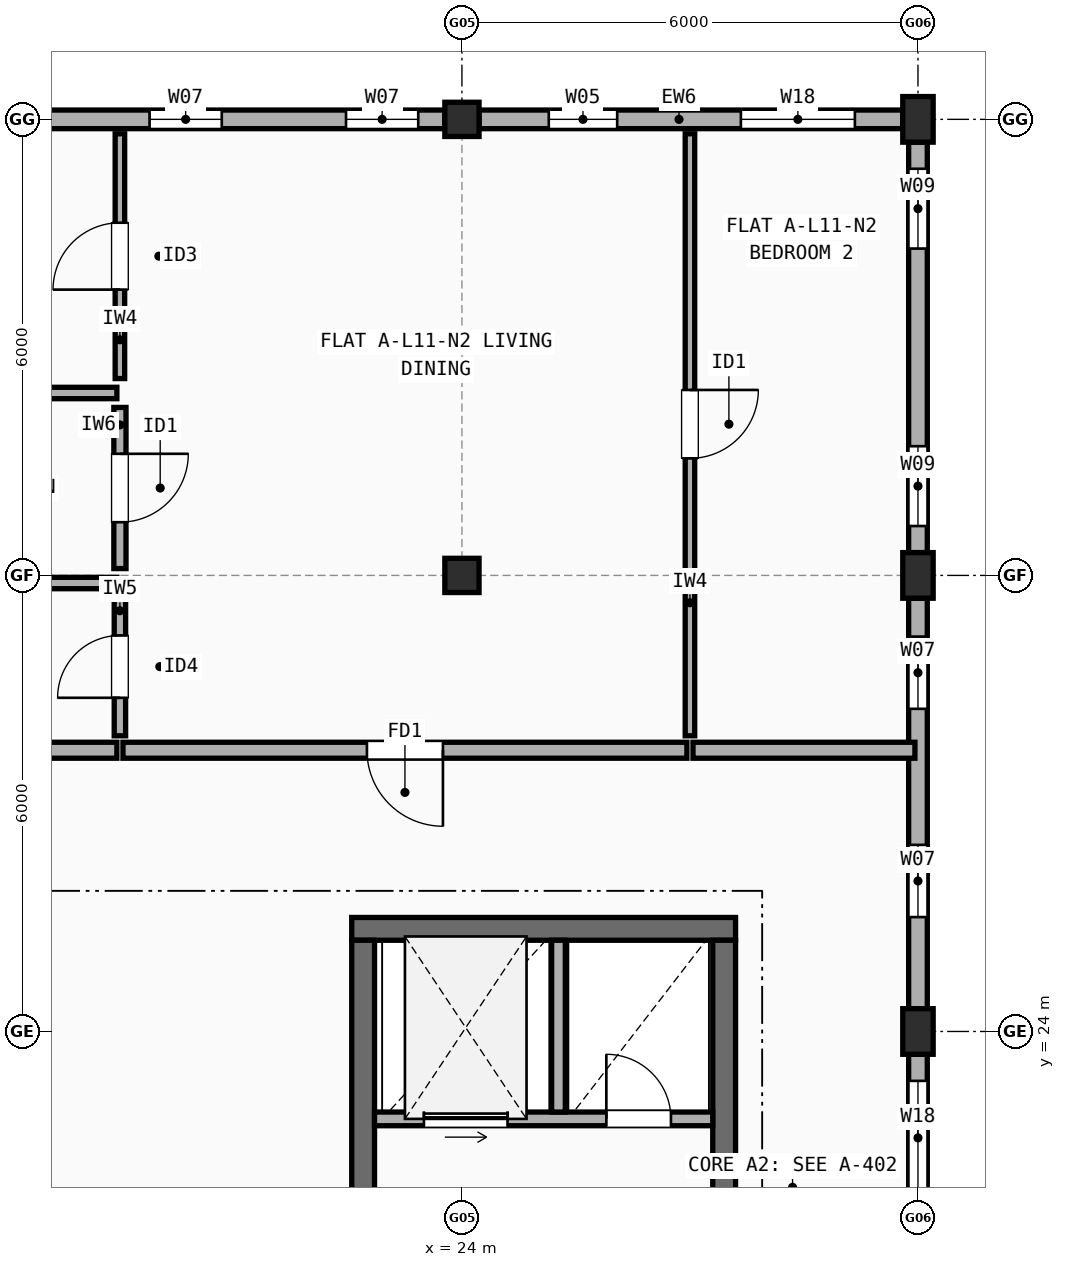
"""IFC4 building model, lengths in metres.
Left out: names, types, materials, properties, quantities, classifications, styles, units other than length and angle.
Written with IfcOpenShell. Run it as: python <this file> out.ifc"""

import sys

from ifc_helpers import new_model, si_unit, direction, frame, frame_2d, origin, origin_2d, place, context, subcontext, project, spatial, rectangle, extrude, element, fill, save


model = new_model("IFC4")
c1 = context("Model", 3, precision=1e-05, world=origin(), true_north=direction((0.0, 1.0)))
c2 = subcontext(c1, "Body", "Model", "MODEL_VIEW")
j1 = project(units=[si_unit("LENGTHUNIT", "METRE"), si_unit("PLANEANGLEUNIT", "RADIAN")], contexts=[c1])
p1 = place(None, origin())
s1 = spatial("IfcSite", under=j1, at=p1, CompositionType="ELEMENT")
p2 = place(p1, origin())
s2 = spatial("IfcBuilding", under=s1, at=p2, CompositionType="ELEMENT")
p3 = place(p2, frame((0.0, 0.0, 36.5)))
s3 = spatial("IfcBuildingStorey", under=s2, at=p3, CompositionType="ELEMENT", Elevation=36.5)
for number, where, z_axis, x_axis in (
    (1, (24.0, 30.0, 0.0), (0.0, 0.0, 1.0), (1.0, 0.0, 0.0)),
    (2, (24.0, 36.0, 0.0), (0.0, 0.0, 1.0), (1.0, 0.0, 0.0)),
):
    element("IfcColumn", number, at=place(p3, frame(where, z_axis=z_axis, x_axis=x_axis)), inside=s3, PredefinedType="COLUMN", context=c2, shape_type="SweptSolid", body=[
        extrude(rectangle(XDim=0.45, YDim=0.45, at=origin_2d()), origin(), (0.0, 0.0, 1.0), 2.995),
    ])
for number, where, z_axis, x_axis in (
    (3, (30.0, 24.0, 0.0), (0.0, 0.0, 1.0), (1.0, 0.0, 0.0)),
    (4, (30.0, 30.0, 0.0), (0.0, 0.0, 1.0), (1.0, 0.0, 0.0)),
    (5, (30.0, 36.0, 0.0), (0.0, 0.0, 1.0), (1.0, 0.0, 0.0)),
):
    element("IfcColumn", number, at=place(p3, frame(where, z_axis=z_axis, x_axis=x_axis)), inside=s3, PredefinedType="COLUMN", context=c2, shape_type="SweptSolid", body=[
        extrude(rectangle(XDim=0.4, YDim=0.6, at=origin_2d()), origin(), (0.0, 0.0, 1.0), 2.995),
    ])
p4 = place(p3, frame((30.0, 18.3, 0.0), z_axis=(0.0, 0.0, 1.0), x_axis=(0.0, 1.0, 0.0)))
e6 = element("IfcWall", 6, at=p4, inside=s3, PredefinedType="STANDARD", context=c2, shape_type="SweptSolid", body=[
    extrude(rectangle(XDim=5.4, YDim=0.245, at=frame_2d((2.7, 0.0))), origin(), (0.0, 0.0, 1.0), 2.477),
])
p5 = place(p4, frame((0.35, 0.0, 0.9)))
e7 = element("IfcOpeningElement", 7, at=p5, cuts=e6, PredefinedType="OPENING", context=c2, shape_type="SweptSolid", body=[
    extrude(rectangle(XDim=1.5, YDim=1.4, at=frame_2d((0.75, 0.7))), frame((0.0, 0.133, 0.0), z_axis=(0.0, -1.0, 0.0), x_axis=(1.0, 0.0, 0.0)), (0.0, 0.0, 1.0), 0.265),
])
p6 = place(p4, frame((3.55, 0.0, 0.9)))
e8 = element("IfcOpeningElement", 8, at=p6, cuts=e6, PredefinedType="OPENING", context=c2, shape_type="SweptSolid", body=[
    extrude(rectangle(XDim=1.5, YDim=1.4, at=frame_2d((0.75, 0.7))), frame((0.0, 0.133, 0.0), z_axis=(0.0, -1.0, 0.0), x_axis=(1.0, 0.0, 0.0)), (0.0, 0.0, 1.0), 0.265),
])
p7 = place(p3, frame((30.0, 24.3, 0.0), z_axis=(0.0, 0.0, 1.0), x_axis=(0.0, 1.0, 0.0)))
e9 = element("IfcWall", 9, at=p7, inside=s3, PredefinedType="STANDARD", context=c2, shape_type="SweptSolid", body=[
    extrude(rectangle(XDim=5.4, YDim=0.245, at=frame_2d((2.7, 0.0))), origin(), (0.0, 0.0, 1.0), 2.477),
])
p8 = place(p7, frame((1.205, 0.0, 0.9)))
e10 = element("IfcOpeningElement", 10, at=p8, cuts=e9, PredefinedType="OPENING", context=c2, shape_type="SweptSolid", body=[
    extrude(rectangle(XDim=0.95, YDim=1.35, at=frame_2d((0.475, 0.675))), frame((0.0, 0.133, 0.0), z_axis=(0.0, -1.0, 0.0), x_axis=(1.0, 0.0, 0.0)), (0.0, 0.0, 1.0), 0.265),
])
p9 = place(p7, frame((3.945, 0.0, 0.9)))
e11 = element("IfcOpeningElement", 11, at=p9, cuts=e9, PredefinedType="OPENING", context=c2, shape_type="SweptSolid", body=[
    extrude(rectangle(XDim=0.95, YDim=1.35, at=frame_2d((0.475, 0.675))), frame((0.0, 0.133, 0.0), z_axis=(0.0, -1.0, 0.0), x_axis=(1.0, 0.0, 0.0)), (0.0, 0.0, 1.0), 0.265),
])
p10 = place(p3, frame((30.0, 30.3, 0.0), z_axis=(0.0, 0.0, 1.0), x_axis=(0.0, 1.0, 0.0)))
e12 = element("IfcWall", 12, at=p10, inside=s3, PredefinedType="STANDARD", context=c2, shape_type="SweptSolid", body=[
    extrude(rectangle(XDim=5.4, YDim=0.245, at=frame_2d((2.7, 0.0))), origin(), (0.0, 0.0, 1.0), 2.477),
])
p11 = place(p10, frame((0.35, 0.0, 0.9)))
e13 = element("IfcOpeningElement", 13, at=p11, cuts=e12, PredefinedType="OPENING", context=c2, shape_type="SweptSolid", body=[
    extrude(rectangle(XDim=1.05, YDim=1.35, at=frame_2d((0.525, 0.675))), frame((0.0, 0.133, 0.0), z_axis=(0.0, -1.0, 0.0), x_axis=(1.0, 0.0, 0.0)), (0.0, 0.0, 1.0), 0.265),
])
p12 = place(p10, frame((4.0, 0.0, 0.9)))
e14 = element("IfcOpeningElement", 14, at=p12, cuts=e12, PredefinedType="OPENING", context=c2, shape_type="SweptSolid", body=[
    extrude(rectangle(XDim=1.05, YDim=1.35, at=frame_2d((0.525, 0.675))), frame((0.0, 0.133, 0.0), z_axis=(0.0, -1.0, 0.0), x_axis=(1.0, 0.0, 0.0)), (0.0, 0.0, 1.0), 0.265),
])
p13 = place(p3, frame((29.8, 36.0, 0.0), z_axis=(0.0, 0.0, 1.0), x_axis=(-1.0, 0.0, 0.0)))
e15 = element("IfcWall", 15, at=p13, inside=s3, PredefinedType="STANDARD", context=c2, shape_type="SweptSolid", body=[
    extrude(rectangle(XDim=5.575, YDim=0.245, at=frame_2d((2.788, 0.0))), origin(), (0.0, 0.0, 1.0), 2.477),
])
p14 = place(p13, frame((0.63, 0.0, 0.9)))
e16 = element("IfcOpeningElement", 16, at=p14, cuts=e15, PredefinedType="OPENING", context=c2, shape_type="SweptSolid", body=[
    extrude(rectangle(XDim=1.5, YDim=1.4, at=frame_2d((0.75, 0.7))), frame((0.0, 0.133, 0.0), z_axis=(0.0, -1.0, 0.0), x_axis=(1.0, 0.0, 0.0)), (0.0, 0.0, 1.0), 0.265),
])
p15 = place(p13, frame((3.758, 0.0, 0.9)))
e17 = element("IfcOpeningElement", 17, at=p15, cuts=e15, PredefinedType="OPENING", context=c2, shape_type="SweptSolid", body=[
    extrude(rectangle(XDim=0.9, YDim=1.4, at=frame_2d((0.45, 0.7))), frame((0.0, 0.133, 0.0), z_axis=(0.0, -1.0, 0.0), x_axis=(1.0, 0.0, 0.0)), (0.0, 0.0, 1.0), 0.265),
])
p16 = place(p3, frame((23.775, 36.0, 0.0), z_axis=(0.0, 0.0, 1.0), x_axis=(-1.0, 0.0, 0.0)))
e18 = element("IfcWall", 18, at=p16, inside=s3, PredefinedType="STANDARD", context=c2, shape_type="SweptSolid", body=[
    extrude(rectangle(XDim=5.55, YDim=0.245, at=frame_2d((2.775, 0.0))), origin(), (0.0, 0.0, 1.0), 2.477),
])
p17 = place(p16, frame((0.35, 0.0, 0.9)))
e19 = element("IfcOpeningElement", 19, at=p17, cuts=e18, PredefinedType="OPENING", context=c2, shape_type="SweptSolid", body=[
    extrude(rectangle(XDim=0.95, YDim=1.35, at=frame_2d((0.475, 0.675))), frame((0.0, 0.133, 0.0), z_axis=(0.0, -1.0, 0.0), x_axis=(1.0, 0.0, 0.0)), (0.0, 0.0, 1.0), 0.265),
])
p18 = place(p16, frame((2.935, 0.0, 0.9)))
e20 = element("IfcOpeningElement", 20, at=p18, cuts=e18, PredefinedType="OPENING", context=c2, shape_type="SweptSolid", body=[
    extrude(rectangle(XDim=0.95, YDim=1.35, at=frame_2d((0.475, 0.675))), frame((0.0, 0.133, 0.0), z_axis=(0.0, -1.0, 0.0), x_axis=(1.0, 0.0, 0.0)), (0.0, 0.0, 1.0), 0.265),
])
p19 = place(p3, frame((27.6, 25.35, 0.0), z_axis=(0.0, 0.0, 1.0), x_axis=(-1.0, 0.0, 0.0)))
e21 = element("IfcWall", 21, at=p19, inside=s3, PredefinedType="SHEAR", context=c2, shape_type="SweptSolid", body=[
    extrude(rectangle(XDim=5.05, YDim=0.3, at=frame_2d((2.525, 0.0))), origin(), (0.0, 0.0, 1.0), 2.995),
])
p20 = place(p3, frame((27.45, 18.75, 0.0), z_axis=(0.0, 0.0, 1.0), x_axis=(0.0, 1.0, 0.0)))
e22 = element("IfcWall", 22, at=p20, inside=s3, PredefinedType="SHEAR", context=c2, shape_type="SweptSolid", body=[
    extrude(rectangle(XDim=6.45, YDim=0.3, at=frame_2d((3.225, 0.0))), origin(), (0.0, 0.0, 1.0), 2.995),
])
p21 = place(p3, frame((22.7, 21.75, 0.0), z_axis=(0.0, 0.0, 1.0), x_axis=(0.0, 1.0, 0.0)))
e23 = element("IfcWall", 23, at=p21, inside=s3, PredefinedType="SHEAR", context=c2, shape_type="SweptSolid", body=[
    extrude(rectangle(XDim=3.45, YDim=0.3, at=frame_2d((1.725, 0.0))), origin(), (0.0, 0.0, 1.0), 2.995),
])
p22 = place(p3, frame((22.85, 22.85, 0.0), z_axis=(0.0, 0.0, 1.0), x_axis=(1.0, 0.0, 0.0)))
e24 = element("IfcWall", 24, at=p22, inside=s3, PredefinedType="SOLIDWALL", context=c2, shape_type="SweptSolid", body=[
    extrude(rectangle(XDim=4.45, YDim=0.18, at=frame_2d((2.225, 0.0))), origin(), (0.0, 0.0, 1.0), 2.995),
])
p23 = place(p22, frame((0.65, 0.0, 0.0)))
e25 = element("IfcOpeningElement", 25, at=p23, cuts=e24, PredefinedType="OPENING", context=c2, shape_type="SweptSolid", body=[
    extrude(rectangle(XDim=1.1, YDim=2.15, at=frame_2d((0.55, 1.075))), frame((0.0, 0.1, 0.0), z_axis=(0.0, -1.0, 0.0), x_axis=(1.0, 0.0, 0.0)), (0.0, 0.0, 1.0), 0.2),
])
p24 = place(p22, frame((3.05, 0.0, 0.0)))
e26 = element("IfcOpeningElement", 26, at=p24, cuts=e24, PredefinedType="OPENING", context=c2, shape_type="SweptSolid", body=[
    extrude(rectangle(XDim=0.85, YDim=2.1, at=frame_2d((0.425, 1.05))), frame((0.0, 0.1, 0.0), z_axis=(0.0, -1.0, 0.0), x_axis=(1.0, 0.0, 0.0)), (0.0, 0.0, 1.0), 0.2),
])
p25 = place(p3, frame((25.27, 22.94, 0.0), z_axis=(0.0, 0.0, 1.0), x_axis=(0.0, 1.0, 0.0)))
e27 = element("IfcWall", 27, at=p25, inside=s3, PredefinedType="SOLIDWALL", context=c2, shape_type="SweptSolid", body=[
    extrude(rectangle(XDim=2.26, YDim=0.18, at=frame_2d((1.13, 0.0))), origin(), (0.0, 0.0, 1.0), 2.995),
])
p26 = place(p3, frame((15.04, 27.7, 0.0), z_axis=(0.0, 0.0, 1.0), x_axis=(1.0, 0.0, 0.0)))
e28 = element("IfcWall", 28, at=p26, inside=s3, PredefinedType="SOLIDWALL", context=c2, shape_type="SweptSolid", body=[
    extrude(rectangle(XDim=4.42, YDim=0.21, at=frame_2d((2.21, 0.0))), origin(), (0.0, 0.0, 1.0), 2.995),
])
p27 = place(p3, frame((19.54, 27.7, 0.0), z_axis=(0.0, 0.0, 1.0), x_axis=(1.0, 0.0, 0.0)))
e29 = element("IfcWall", 29, at=p27, inside=s3, PredefinedType="SOLIDWALL", context=c2, shape_type="SweptSolid", body=[
    extrude(rectangle(XDim=7.42, YDim=0.21, at=frame_2d((3.71, 0.0))), origin(), (0.0, 0.0, 1.0), 2.995),
])
p28 = place(p27, frame((3.21, 0.0, 0.0)))
e30 = element("IfcOpeningElement", 30, at=p28, cuts=e29, PredefinedType="OPENING", context=c2, shape_type="SweptSolid", body=[
    extrude(rectangle(XDim=1.0, YDim=2.15, at=frame_2d((0.5, 1.075))), frame((0.0, 0.115, 0.0), z_axis=(0.0, -1.0, 0.0), x_axis=(1.0, 0.0, 0.0)), (0.0, 0.0, 1.0), 0.23),
])
p29 = place(p3, frame((19.5, 32.59, 0.0), z_axis=(0.0, 0.0, 1.0), x_axis=(0.0, 1.0, 0.0)))
e31 = element("IfcWall", 31, at=p29, inside=s3, PredefinedType="PARTITIONING", context=c2, shape_type="SweptSolid", body=[
    extrude(rectangle(XDim=3.22, YDim=0.125, at=frame_2d((1.61, 0.0))), origin(), (0.0, 0.0, 1.0), 2.995),
])
p30 = place(p29, frame((1.17, 0.0, 0.0)))
e32 = element("IfcOpeningElement", 32, at=p30, cuts=e31, PredefinedType="OPENING", context=c2, shape_type="SweptSolid", body=[
    extrude(rectangle(XDim=0.88, YDim=2.1, at=frame_2d((0.44, 1.05))), frame((0.0, 0.073, 0.0), z_axis=(0.0, -1.0, 0.0), x_axis=(1.0, 0.0, 0.0)), (0.0, 0.0, 1.0), 0.145),
])
p31 = place(p3, frame((19.5, 30.09, 0.0), z_axis=(0.0, 0.0, 1.0), x_axis=(0.0, 1.0, 0.0)))
e33 = element("IfcWall", 33, at=p31, inside=s3, PredefinedType="PLUMBINGWALL", context=c2, shape_type="SweptSolid", body=[
    extrude(rectangle(XDim=2.12, YDim=0.16, at=frame_2d((1.06, 0.0))), origin(), (0.0, 0.0, 1.0), 2.527),
])
p32 = place(p31, frame((0.61, 0.0, 0.0)))
e34 = element("IfcOpeningElement", 34, at=p32, cuts=e33, PredefinedType="OPENING", context=c2, shape_type="SweptSolid", body=[
    extrude(rectangle(XDim=0.9, YDim=2.1, at=frame_2d((0.45, 1.05))), frame((0.0, 0.09, 0.0), z_axis=(0.0, -1.0, 0.0), x_axis=(1.0, 0.0, 0.0)), (0.0, 0.0, 1.0), 0.18),
])
p33 = place(p3, frame((19.5, 27.89, 0.0), z_axis=(0.0, 0.0, 1.0), x_axis=(0.0, 1.0, 0.0)))
e35 = element("IfcWall", 35, at=p33, inside=s3, PredefinedType="PARTITIONING", context=c2, shape_type="SweptSolid", body=[
    extrude(rectangle(XDim=1.82, YDim=0.15, at=frame_2d((0.91, 0.0))), origin(), (0.0, 0.0, 1.0), 2.995),
])
p34 = place(p33, frame((0.5, 0.0, 0.0)))
e36 = element("IfcOpeningElement", 36, at=p34, cuts=e35, PredefinedType="OPENING", context=c2, shape_type="SweptSolid", body=[
    extrude(rectangle(XDim=0.82, YDim=2.08, at=frame_2d((0.41, 1.04))), frame((0.0, 0.085, 0.0), z_axis=(0.0, -1.0, 0.0), x_axis=(1.0, 0.0, 0.0)), (0.0, 0.0, 1.0), 0.17),
])
p35 = place(p3, frame((15.04, 32.4, 0.0), z_axis=(0.0, 0.0, 1.0), x_axis=(1.0, 0.0, 0.0)))
e37 = element("IfcWall", 37, at=p35, inside=s3, PredefinedType="PARTITIONING", context=c2, shape_type="SweptSolid", body=[
    extrude(rectangle(XDim=4.42, YDim=0.15, at=frame_2d((2.21, 0.0))), origin(), (0.0, 0.0, 1.0), 2.508),
])
p36 = place(p3, frame((15.04, 29.9, 0.0), z_axis=(0.0, 0.0, 1.0), x_axis=(1.0, 0.0, 0.0)))
e38 = element("IfcWall", 38, at=p36, inside=s3, PredefinedType="PARTITIONING", context=c2, shape_type="SweptSolid", body=[
    extrude(rectangle(XDim=4.42, YDim=0.15, at=frame_2d((2.21, 0.0))), origin(), (0.0, 0.0, 1.0), 2.527),
])
p37 = place(p3, frame((27.04, 27.7, 0.0), z_axis=(0.0, 0.0, 1.0), x_axis=(1.0, 0.0, 0.0)))
e39 = element("IfcWall", 39, at=p37, inside=s3, PredefinedType="SOLIDWALL", context=c2, shape_type="SweptSolid", body=[
    extrude(rectangle(XDim=2.92, YDim=0.21, at=frame_2d((1.46, 0.0))), origin(), (0.0, 0.0, 1.0), 2.477),
])
p38 = place(p3, frame((27.0, 27.89, 0.0), z_axis=(0.0, 0.0, 1.0), x_axis=(0.0, 1.0, 0.0)))
e40 = element("IfcWall", 40, at=p38, inside=s3, PredefinedType="PARTITIONING", context=c2, shape_type="SweptSolid", body=[
    extrude(rectangle(XDim=7.92, YDim=0.125, at=frame_2d((3.96, 0.0))), origin(), (0.0, 0.0, 1.0), 2.527),
])
p39 = place(p38, frame((3.65, 0.0, 0.0)))
e41 = element("IfcOpeningElement", 41, at=p39, cuts=e40, PredefinedType="OPENING", context=c2, shape_type="SweptSolid", body=[
    extrude(rectangle(XDim=0.9, YDim=2.1, at=frame_2d((0.45, 1.05))), frame((0.0, 0.073, 0.0), z_axis=(0.0, -1.0, 0.0), x_axis=(1.0, 0.0, 0.0)), (0.0, 0.0, 1.0), 0.145),
])
p40 = place(p6, origin())
e42 = element("IfcWindow", 42, at=p40, inside=s3, PartitioningType="SINGLE_PANEL", PredefinedType="WINDOW", context=c2, shape_type="SweptSolid", body=[
    extrude(rectangle(XDim=1.5, YDim=1.4, at=frame_2d((0.75, 0.7))), frame((0.0, 0.03, 0.0), z_axis=(0.0, -1.0, 0.0), x_axis=(1.0, 0.0, 0.0)), (0.0, 0.0, 1.0), 0.06),
])
fill(e8, e42)
p41 = place(p8, origin())
e43 = element("IfcWindow", 43, at=p41, inside=s3, PartitioningType="SINGLE_PANEL", PredefinedType="WINDOW", context=c2, shape_type="SweptSolid", body=[
    extrude(rectangle(XDim=0.95, YDim=1.35, at=frame_2d((0.475, 0.675))), frame((0.0, 0.03, 0.0), z_axis=(0.0, -1.0, 0.0), x_axis=(1.0, 0.0, 0.0)), (0.0, 0.0, 1.0), 0.06),
])
fill(e10, e43)
p42 = place(p9, origin())
e44 = element("IfcWindow", 44, at=p42, inside=s3, PartitioningType="SINGLE_PANEL", PredefinedType="WINDOW", context=c2, shape_type="SweptSolid", body=[
    extrude(rectangle(XDim=0.95, YDim=1.35, at=frame_2d((0.475, 0.675))), frame((0.0, 0.03, 0.0), z_axis=(0.0, -1.0, 0.0), x_axis=(1.0, 0.0, 0.0)), (0.0, 0.0, 1.0), 0.06),
])
fill(e11, e44)
p43 = place(p11, origin())
e45 = element("IfcWindow", 45, at=p43, inside=s3, PartitioningType="SINGLE_PANEL", PredefinedType="WINDOW", context=c2, shape_type="SweptSolid", body=[
    extrude(rectangle(XDim=1.05, YDim=1.35, at=frame_2d((0.525, 0.675))), frame((0.0, 0.03, 0.0), z_axis=(0.0, -1.0, 0.0), x_axis=(1.0, 0.0, 0.0)), (0.0, 0.0, 1.0), 0.06),
])
fill(e13, e45)
p44 = place(p12, origin())
e46 = element("IfcWindow", 46, at=p44, inside=s3, PartitioningType="SINGLE_PANEL", PredefinedType="WINDOW", context=c2, shape_type="SweptSolid", body=[
    extrude(rectangle(XDim=1.05, YDim=1.35, at=frame_2d((0.525, 0.675))), frame((0.0, 0.03, 0.0), z_axis=(0.0, -1.0, 0.0), x_axis=(1.0, 0.0, 0.0)), (0.0, 0.0, 1.0), 0.06),
])
fill(e14, e46)
p45 = place(p14, origin())
e47 = element("IfcWindow", 47, at=p45, inside=s3, PartitioningType="SINGLE_PANEL", PredefinedType="WINDOW", context=c2, shape_type="SweptSolid", body=[
    extrude(rectangle(XDim=1.5, YDim=1.4, at=frame_2d((0.75, 0.7))), frame((0.0, 0.03, 0.0), z_axis=(0.0, -1.0, 0.0), x_axis=(1.0, 0.0, 0.0)), (0.0, 0.0, 1.0), 0.06),
])
fill(e16, e47)
p46 = place(p15, origin())
e48 = element("IfcWindow", 48, at=p46, inside=s3, PartitioningType="SINGLE_PANEL", PredefinedType="WINDOW", context=c2, shape_type="SweptSolid", body=[
    extrude(rectangle(XDim=0.9, YDim=1.4, at=frame_2d((0.45, 0.7))), frame((0.0, 0.03, 0.0), z_axis=(0.0, -1.0, 0.0), x_axis=(1.0, 0.0, 0.0)), (0.0, 0.0, 1.0), 0.06),
])
fill(e17, e48)
p47 = place(p17, origin())
e49 = element("IfcWindow", 49, at=p47, inside=s3, PartitioningType="SINGLE_PANEL", PredefinedType="WINDOW", context=c2, shape_type="SweptSolid", body=[
    extrude(rectangle(XDim=0.95, YDim=1.35, at=frame_2d((0.475, 0.675))), frame((0.0, 0.03, 0.0), z_axis=(0.0, -1.0, 0.0), x_axis=(1.0, 0.0, 0.0)), (0.0, 0.0, 1.0), 0.06),
])
fill(e19, e49)
p48 = place(p18, origin())
e50 = element("IfcWindow", 50, at=p48, inside=s3, PartitioningType="SINGLE_PANEL", PredefinedType="WINDOW", context=c2, shape_type="SweptSolid", body=[
    extrude(rectangle(XDim=0.95, YDim=1.35, at=frame_2d((0.475, 0.675))), frame((0.0, 0.03, 0.0), z_axis=(0.0, -1.0, 0.0), x_axis=(1.0, 0.0, 0.0)), (0.0, 0.0, 1.0), 0.06),
])
fill(e20, e50)
p49 = place(p23, origin())
e51 = element("IfcDoor", 51, at=p49, inside=s3, OperationType="SLIDING_TO_LEFT", PredefinedType="DOOR", context=c2, shape_type="SweptSolid", body=[
    extrude(rectangle(XDim=1.1, YDim=2.15, at=frame_2d((0.55, 1.075))), frame((0.0, 0.025, 0.0), z_axis=(0.0, -1.0, 0.0), x_axis=(1.0, 0.0, 0.0)), (0.0, 0.0, 1.0), 0.05),
])
fill(e25, e51)
p50 = place(p24, frame((0.85, 0.0, 0.0), z_axis=(0.0, 0.0, 1.0), x_axis=(-1.0, 0.0, 0.0)))
e52 = element("IfcDoor", 52, at=p50, inside=s3, OperationType="SINGLE_SWING_LEFT", PredefinedType="DOOR", context=c2, shape_type="SweptSolid", body=[
    extrude(rectangle(XDim=0.85, YDim=2.1, at=frame_2d((0.425, 1.05))), frame((0.0, 0.025, 0.0), z_axis=(0.0, -1.0, 0.0), x_axis=(1.0, 0.0, 0.0)), (0.0, 0.0, 1.0), 0.05),
])
fill(e26, e52)
p51 = place(p28, origin())
e53 = element("IfcDoor", 53, at=p51, inside=s3, OperationType="SINGLE_SWING_RIGHT", PredefinedType="DOOR", context=c2, shape_type="SweptSolid", body=[
    extrude(rectangle(XDim=1.0, YDim=2.15, at=frame_2d((0.5, 1.075))), frame((0.0, 0.025, 0.0), z_axis=(0.0, -1.0, 0.0), x_axis=(1.0, 0.0, 0.0)), (0.0, 0.0, 1.0), 0.05),
])
fill(e30, e53)
p52 = place(p30, origin())
e54 = element("IfcDoor", 54, at=p52, inside=s3, OperationType="SINGLE_SWING_LEFT", PredefinedType="DOOR", context=c2, shape_type="SweptSolid", body=[
    extrude(rectangle(XDim=0.88, YDim=2.1, at=frame_2d((0.44, 1.05))), frame((0.0, 0.025, 0.0), z_axis=(0.0, -1.0, 0.0), x_axis=(1.0, 0.0, 0.0)), (0.0, 0.0, 1.0), 0.05),
])
fill(e32, e54)
p53 = place(p32, origin())
e55 = element("IfcDoor", 55, at=p53, inside=s3, OperationType="SINGLE_SWING_RIGHT", PredefinedType="DOOR", context=c2, shape_type="SweptSolid", body=[
    extrude(rectangle(XDim=0.9, YDim=2.1, at=frame_2d((0.45, 1.05))), frame((0.0, 0.025, 0.0), z_axis=(0.0, -1.0, 0.0), x_axis=(1.0, 0.0, 0.0)), (0.0, 0.0, 1.0), 0.05),
])
fill(e34, e55)
p54 = place(p34, origin())
e56 = element("IfcDoor", 56, at=p54, inside=s3, OperationType="SINGLE_SWING_LEFT", PredefinedType="DOOR", context=c2, shape_type="SweptSolid", body=[
    extrude(rectangle(XDim=0.82, YDim=2.08, at=frame_2d((0.41, 1.04))), frame((0.0, 0.025, 0.0), z_axis=(0.0, -1.0, 0.0), x_axis=(1.0, 0.0, 0.0)), (0.0, 0.0, 1.0), 0.05),
])
fill(e36, e56)
p55 = place(p39, origin())
e57 = element("IfcDoor", 57, at=p55, inside=s3, OperationType="SINGLE_SWING_RIGHT", PredefinedType="DOOR", context=c2, shape_type="SweptSolid", body=[
    extrude(rectangle(XDim=0.9, YDim=2.1, at=frame_2d((0.45, 1.05))), frame((0.0, 0.025, 0.0), z_axis=(0.0, -1.0, 0.0), x_axis=(1.0, 0.0, 0.0)), (0.0, 0.0, 1.0), 0.05),
])
fill(e41, e57)
save(model, sys.argv[1])
